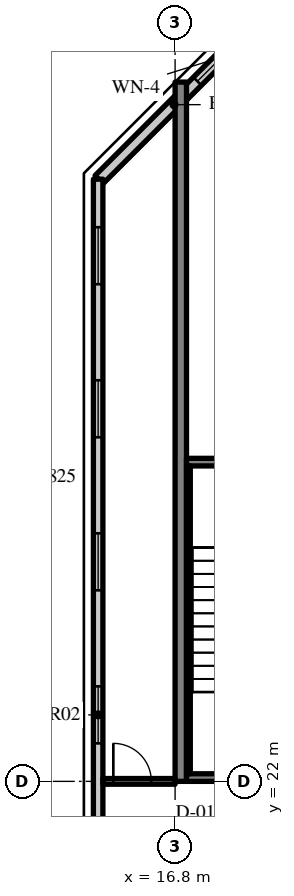
"""IFC4 building model, lengths in metres.
Left out: names, types, materials, properties, quantities, classifications, styles, units other than length and angle.
Written with IfcOpenShell. Run it as: python <this file> out.ifc"""

import sys

from ifc_helpers import new_model, si_unit, direction, frame, frame_2d, origin, place, context, subcontext, project, spatial, rectangle, extrude, source, transform, mapped, element, fill, save


model = new_model("IFC4")
c1 = context("Model", 3, precision=1e-05, world=origin(), true_north=direction((0.0, 1.0)))
c2 = subcontext(c1, "Body", "Model", "MODEL_VIEW")
j1 = project(units=[si_unit("LENGTHUNIT", "METRE"), si_unit("PLANEANGLEUNIT", "RADIAN")], contexts=[c1])
p1 = place(None, origin())
s1 = spatial("IfcSite", under=j1, at=p1, CompositionType="ELEMENT")
p2 = place(p1, origin())
s2 = spatial("IfcBuilding", under=s1, at=p2, CompositionType="ELEMENT")
p3 = place(p2, frame((0.0, 0.0, 241.3)))
s3 = spatial("IfcBuildingStorey", under=s2, at=p3, CompositionType="ELEMENT", Elevation=241.3)
m1 = source(origin(), c2, "Body", "SweptSolid", [
    extrude(rectangle(XDim=18.4, YDim=0.3, at=frame_2d((9.2, 0.0))), origin(), (0.0, 0.0, 1.0), 3.62),
])
p4 = place(p3, frame((16.95, 22.0, 0.0), z_axis=(0.0, 0.0, 1.0), x_axis=(0.0, 1.0, 0.0)))
e1 = element("IfcWall", 1, at=p4, inside=s3, PredefinedType="SHEAR", context=c2, shape_type="MappedRepresentation", body=[
    mapped(m1, transform((0.0, 0.0, 0.0), scale=1.0)),
])
m2 = source(origin(), c2, "Body", "SweptSolid", [
    extrude(rectangle(XDim=5.576, YDim=0.3, at=frame_2d((2.788, 0.0))), origin(), (0.0, 0.0, 1.0), 3.62),
])
p5 = place(p3, frame((18.743, 41.777, 0.0), z_axis=(0.0, 0.0, 1.0), x_axis=(-0.707106781187, -0.707106781187, 0.0)))
e2 = element("IfcWall", 2, at=p5, inside=s3, PredefinedType="SOLIDWALL", context=c2, shape_type="MappedRepresentation", body=[
    mapped(m2, transform((0.0, 0.0, 0.0), scale=1.0)),
])
m3 = source(origin(), c2, "Body", "SweptSolid", [
    extrude(rectangle(XDim=1.8, YDim=1.5, at=frame_2d((0.9, 0.75))), frame((0.0, 0.16, 0.0), z_axis=(0.0, -1.0, 0.0), x_axis=(1.0, 0.0, 0.0)), (0.0, 0.0, 1.0), 0.32),
])
p6 = place(p5, frame((0.118, 0.0, 0.9)))
e3 = element("IfcOpeningElement", 3, at=p6, cuts=e2, PredefinedType="OPENING", context=c2, shape_type="MappedRepresentation", body=[
    mapped(m3, transform((0.0, 0.0, 0.0), scale=1.0)),
])
m4 = source(origin(), c2, "Body", "SweptSolid", [
    extrude(rectangle(XDim=28.189, YDim=0.25, at=frame_2d((14.095, 0.0))), origin(), (0.0, 0.0, 1.0), 3.62),
])
p7 = place(p3, frame((14.775, 37.845, 0.0), z_axis=(0.0, 0.0, 1.0), x_axis=(0.0, -1.0, 0.0)))
e4 = element("IfcWall", 4, at=p7, inside=s3, PredefinedType="SOLIDWALL", context=c2, shape_type="MappedRepresentation", body=[
    mapped(m4, transform((0.0, 0.0, 0.0), scale=1.0)),
])
m5 = source(origin(), c2, "Body", "SweptSolid", [
    extrude(rectangle(XDim=1.5, YDim=1.5, at=frame_2d((0.75, 0.75))), frame((0.0, 0.135, 0.0), z_axis=(0.0, -1.0, 0.0), x_axis=(1.0, 0.0, 0.0)), (0.0, 0.0, 1.0), 0.27),
])
p8 = place(p7, frame((1.263, 0.0, 0.9)))
e5 = element("IfcOpeningElement", 5, at=p8, cuts=e4, PredefinedType="OPENING", context=c2, shape_type="MappedRepresentation", body=[
    mapped(m5, transform((0.0, 0.0, 0.0), scale=1.0)),
])
p9 = place(p7, frame((5.291, 0.0, 0.9)))
e6 = element("IfcOpeningElement", 6, at=p9, cuts=e4, PredefinedType="OPENING", context=c2, shape_type="MappedRepresentation", body=[
    mapped(m5, transform((0.0, 0.0, 0.0), scale=1.0)),
])
p10 = place(p7, frame((9.318, 0.0, 0.9)))
e7 = element("IfcOpeningElement", 7, at=p10, cuts=e4, PredefinedType="OPENING", context=c2, shape_type="MappedRepresentation", body=[
    mapped(m5, transform((0.0, 0.0, 0.0), scale=1.0)),
])
p11 = place(p7, frame((13.345, 0.0, 0.9)))
e8 = element("IfcOpeningElement", 8, at=p11, cuts=e4, PredefinedType="OPENING", context=c2, shape_type="MappedRepresentation", body=[
    mapped(m5, transform((0.0, 0.0, 0.0), scale=1.0)),
])
p12 = place(p7, frame((17.372, 0.0, 0.9)))
e9 = element("IfcOpeningElement", 9, at=p12, cuts=e4, PredefinedType="OPENING", context=c2, shape_type="MappedRepresentation", body=[
    mapped(m5, transform((0.0, 0.0, 0.0), scale=1.0)),
])
p13 = place(p7, frame((21.399, 0.0, 0.9)))
e10 = element("IfcOpeningElement", 10, at=p13, cuts=e4, PredefinedType="OPENING", context=c2, shape_type="MappedRepresentation", body=[
    mapped(m5, transform((0.0, 0.0, 0.0), scale=1.0)),
])
p14 = place(p7, frame((25.426, 0.0, 0.9)))
e11 = element("IfcOpeningElement", 11, at=p14, cuts=e4, PredefinedType="OPENING", context=c2, shape_type="MappedRepresentation", body=[
    mapped(m5, transform((0.0, 0.0, 0.0), scale=1.0)),
])
m6 = source(origin(), c2, "Body", "SweptSolid", [
    extrude(rectangle(XDim=8.1, YDim=0.2, at=frame_2d((4.05, 0.0))), origin(), (0.0, 0.0, 1.0), 3.62),
])
p15 = place(p3, frame((17.1, 22.1, 0.0), z_axis=(0.0, 0.0, 1.0), x_axis=(1.0, 0.0, 0.0)))
e12 = element("IfcWall", 12, at=p15, inside=s3, PredefinedType="SOLIDWALL", context=c2, shape_type="MappedRepresentation", body=[
    mapped(m6, transform((0.0, 0.0, 0.0), scale=1.0)),
])
m7 = source(origin(), c2, "Body", "SweptSolid", [
    extrude(rectangle(XDim=1.2, YDim=2.1, at=frame_2d((0.6, 1.05))), frame((0.0, 0.11, 0.0), z_axis=(0.0, -1.0, 0.0), x_axis=(1.0, 0.0, 0.0)), (0.0, 0.0, 1.0), 0.22),
])
p16 = place(p15, frame((5.9, 0.0, 0.0)))
e13 = element("IfcOpeningElement", 13, at=p16, cuts=e12, PredefinedType="OPENING", context=c2, shape_type="MappedRepresentation", body=[
    mapped(m7, transform((0.0, 0.0, 0.0), scale=1.0)),
])
p17 = place(p3, frame((17.1, 30.4, 0.0), z_axis=(0.0, 0.0, 1.0), x_axis=(1.0, 0.0, 0.0)))
e14 = element("IfcWall", 14, at=p17, inside=s3, PredefinedType="SOLIDWALL", context=c2, shape_type="MappedRepresentation", body=[
    mapped(m6, transform((0.0, 0.0, 0.0), scale=1.0)),
])
m8 = source(origin(), c2, "Body", "SweptSolid", [
    extrude(rectangle(XDim=1.0, YDim=2.1, at=frame_2d((0.5, 1.05))), frame((0.0, 0.11, 0.0), z_axis=(0.0, -1.0, 0.0), x_axis=(1.0, 0.0, 0.0)), (0.0, 0.0, 1.0), 0.22),
])
p18 = place(p17, frame((6.0, 0.0, 0.0)))
e15 = element("IfcOpeningElement", 15, at=p18, cuts=e14, PredefinedType="OPENING", context=c2, shape_type="MappedRepresentation", body=[
    mapped(m8, transform((0.0, 0.0, 0.0), scale=1.0)),
])
m9 = source(origin(), c2, "Body", "SweptSolid", [
    extrude(rectangle(XDim=8.1, YDim=0.1, at=frame_2d((4.05, 0.0))), origin(), (0.0, 0.0, 1.0), 3.62),
])
p19 = place(p3, frame((17.15, 22.2, 0.0), z_axis=(0.0, 0.0, 1.0), x_axis=(0.0, 1.0, 0.0)))
e16 = element("IfcWall", 16, at=p19, inside=s3, PredefinedType="SOLIDWALL", context=c2, shape_type="MappedRepresentation", body=[
    mapped(m9, transform((0.0, 0.0, 0.0), scale=1.0)),
])
m10 = source(origin(), c2, "Body", "SweptSolid", [
    extrude(rectangle(XDim=1.9, YDim=0.15, at=frame_2d((0.95, 0.0))), origin(), (0.0, 0.0, 1.0), 2.92),
])
p20 = place(p3, frame((14.9, 22.0, 0.0), z_axis=(0.0, 0.0, 1.0), x_axis=(1.0, 0.0, 0.0)))
e17 = element("IfcWall", 17, at=p20, inside=s3, PredefinedType="PARTITIONING", context=c2, shape_type="MappedRepresentation", body=[
    mapped(m10, transform((0.0, 0.0, 0.0), scale=1.0)),
])
m11 = source(origin(), c2, "Body", "SweptSolid", [
    extrude(rectangle(XDim=1.0, YDim=2.1, at=frame_2d((0.5, 1.05))), frame((0.0, 0.085, 0.0), z_axis=(0.0, -1.0, 0.0), x_axis=(1.0, 0.0, 0.0)), (0.0, 0.0, 1.0), 0.17),
])
p21 = place(p20, frame((0.275, 0.0, 0.0)))
e18 = element("IfcOpeningElement", 18, at=p21, cuts=e17, PredefinedType="OPENING", context=c2, shape_type="MappedRepresentation", body=[
    mapped(m11, transform((0.0, 0.0, 0.0), scale=1.0)),
])
m12 = source(origin(), c2, "Body", "SweptSolid", [
    extrude(rectangle(XDim=1.8, YDim=1.5, at=frame_2d((0.9, 0.75))), frame((0.0, 0.03, 0.0), z_axis=(0.0, -1.0, 0.0), x_axis=(1.0, 0.0, 0.0)), (0.0, 0.0, 1.0), 0.06),
])
p22 = place(p6, origin())
e19 = element("IfcWindow", 19, at=p22, inside=s3, PartitioningType="SINGLE_PANEL", PredefinedType="WINDOW", context=c2, shape_type="MappedRepresentation", body=[
    mapped(m12, transform((0.0, 0.0, 0.0), scale=1.0)),
])
fill(e3, e19)
m13 = source(origin(), c2, "Body", "SweptSolid", [
    extrude(rectangle(XDim=1.5, YDim=1.5, at=frame_2d((0.75, 0.75))), frame((0.0, 0.03, 0.0), z_axis=(0.0, -1.0, 0.0), x_axis=(1.0, 0.0, 0.0)), (0.0, 0.0, 1.0), 0.06),
])
p23 = place(p8, origin())
e20 = element("IfcWindow", 20, at=p23, inside=s3, PartitioningType="SINGLE_PANEL", PredefinedType="WINDOW", context=c2, shape_type="MappedRepresentation", body=[
    mapped(m13, transform((0.0, 0.0, 0.0), scale=1.0)),
])
fill(e5, e20)
p24 = place(p9, origin())
e21 = element("IfcWindow", 21, at=p24, inside=s3, PartitioningType="SINGLE_PANEL", PredefinedType="WINDOW", context=c2, shape_type="MappedRepresentation", body=[
    mapped(m13, transform((0.0, 0.0, 0.0), scale=1.0)),
])
fill(e6, e21)
p25 = place(p10, origin())
e22 = element("IfcWindow", 22, at=p25, inside=s3, PartitioningType="SINGLE_PANEL", PredefinedType="WINDOW", context=c2, shape_type="MappedRepresentation", body=[
    mapped(m13, transform((0.0, 0.0, 0.0), scale=1.0)),
])
fill(e7, e22)
p26 = place(p11, origin())
e23 = element("IfcWindow", 23, at=p26, inside=s3, PartitioningType="SINGLE_PANEL", PredefinedType="WINDOW", context=c2, shape_type="MappedRepresentation", body=[
    mapped(m13, transform((0.0, 0.0, 0.0), scale=1.0)),
])
fill(e8, e23)
m14 = source(origin(), c2, "Body", "SweptSolid", [
    extrude(rectangle(XDim=1.0, YDim=2.1, at=frame_2d((0.5, 1.05))), frame((0.0, 0.025, 0.0), z_axis=(0.0, -1.0, 0.0), x_axis=(1.0, 0.0, 0.0)), (0.0, 0.0, 1.0), 0.05),
])
p27 = place(p21, origin())
e24 = element("IfcDoor", 24, at=p27, inside=s3, OperationType="SINGLE_SWING_LEFT", PredefinedType="DOOR", context=c2, shape_type="MappedRepresentation", body=[
    mapped(m14, transform((0.0, 0.0, 0.0), scale=1.0)),
])
fill(e18, e24)
save(model, sys.argv[1])
